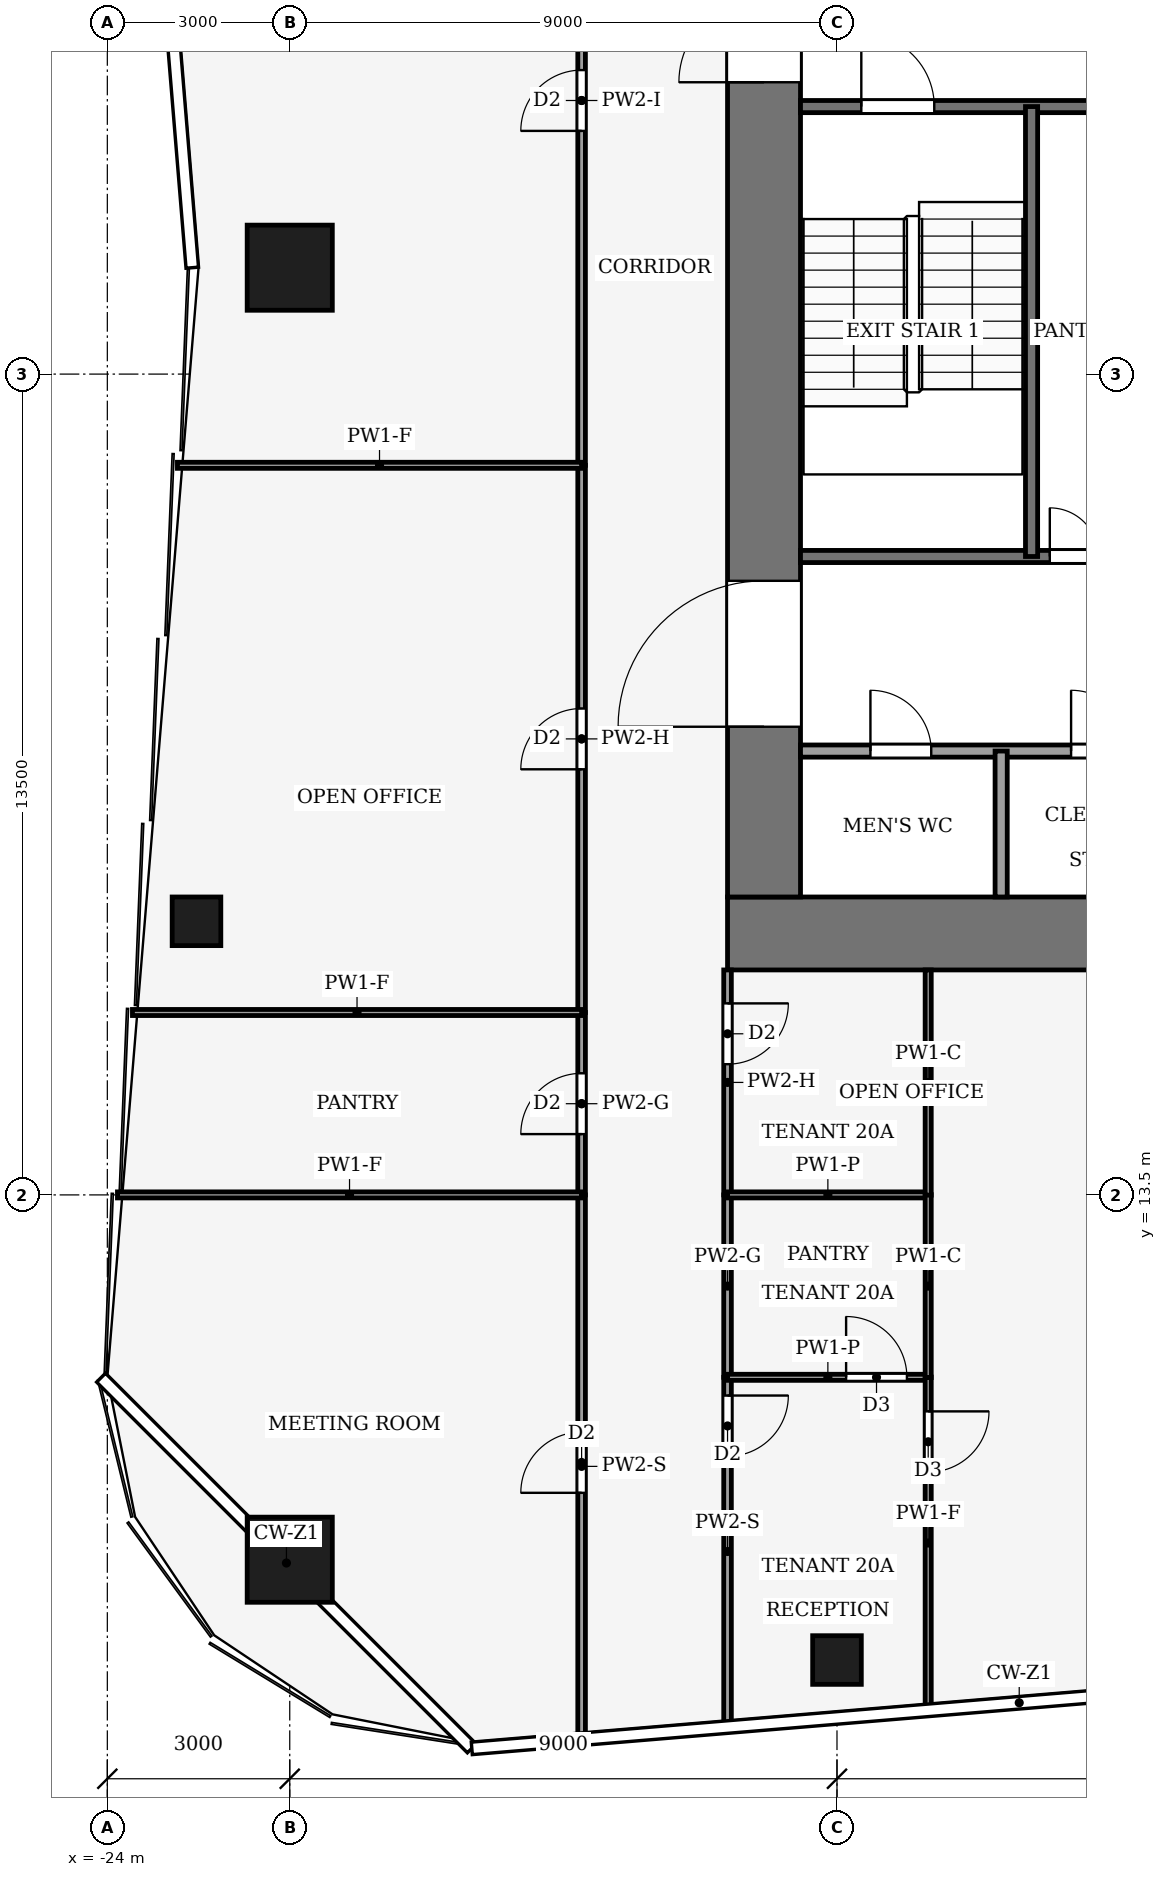
"""IFC4 building model, lengths in metres.
Left out: names, types, materials, properties, quantities, classifications, styles, units other than length and angle.
Written with IfcOpenShell. Run it as: python <this file> out.ifc"""

import sys

from ifc_helpers import new_model, si_unit, direction, frame, frame_2d, origin, origin_2d, place, context, subcontext, project, spatial, rectangle, hollow_rectangle, extrude, element, fill, save


model = new_model("IFC4")
c1 = context("Model", 3, precision=1e-05, world=origin(), true_north=direction((0.0, 1.0)))
c2 = subcontext(c1, "Body", "Model", "MODEL_VIEW")
j1 = project(units=[si_unit("LENGTHUNIT", "METRE"), si_unit("PLANEANGLEUNIT", "RADIAN")], contexts=[c1])
p1 = place(None, origin())
s1 = spatial("IfcSite", under=j1, at=p1, CompositionType="ELEMENT")
p2 = place(p1, origin())
s2 = spatial("IfcBuilding", under=s1, at=p2, CompositionType="ELEMENT")
p3 = place(p2, frame((0.0, 0.0, 90.0)))
s3 = spatial("IfcBuildingStorey", under=s2, at=p3, CompositionType="ELEMENT", Elevation=90.0)
p4 = place(p3, frame((-13.8, 17.8, -0.13), z_axis=(0.0, 0.0, 1.0), x_axis=(1.0, 0.0, 0.0)))
e1 = element("IfcWall", 1, at=p4, inside=s3, PredefinedType="SHEAR", context=c2, shape_type="SweptSolid", body=[
    extrude(rectangle(XDim=27.6, YDim=1.2, at=frame_2d((13.8, 0.0))), origin(), (0.0, 0.0, 1.0), 4.0),
])
p5 = place(p3, frame((-13.2, 18.4, -0.13), z_axis=(0.0, 0.0, 1.0), x_axis=(0.0, 1.0, 0.0)))
e2 = element("IfcWall", 2, at=p5, inside=s3, PredefinedType="SHEAR", context=c2, shape_type="SweptSolid", body=[
    extrude(rectangle(XDim=19.2, YDim=1.2, at=frame_2d((9.6, 0.0))), origin(), (0.0, 0.0, 1.0), 4.0),
])
p6 = place(p5, frame((2.8, 0.0, 0.13)))
e3 = element("IfcOpeningElement", 3, at=p6, cuts=e2, PredefinedType="OPENING", context=c2, shape_type="SweptSolid", body=[
    extrude(rectangle(XDim=2.4, YDim=2.4, at=frame_2d((1.2, 1.2))), frame((0.0, 0.61, 0.0), z_axis=(0.0, -1.0, 0.0), x_axis=(1.0, 0.0, 0.0)), (0.0, 0.0, 1.0), 1.22),
])
p7 = place(p5, frame((13.4, 0.0, 0.13)))
e4 = element("IfcOpeningElement", 4, at=p7, cuts=e2, PredefinedType="OPENING", context=c2, shape_type="SweptSolid", body=[
    extrude(rectangle(XDim=1.4, YDim=2.2, at=frame_2d((0.7, 1.1))), frame((0.0, 0.61, 0.0), z_axis=(0.0, -1.0, 0.0), x_axis=(1.0, 0.0, 0.0)), (0.0, 0.0, 1.0), 1.22),
])
for number, where, z_axis, x_axis in (
    (5, (-21.0, 7.5, 0.0), (0.0, 0.0, 1.0), (1.0, 0.0, 0.0)),
    (6, (-21.0, 28.75, 0.0), (0.0, 0.0, 1.0), (1.0, 0.0, 0.0)),
):
    element("IfcColumn", number, at=place(p3, frame(where, z_axis=z_axis, x_axis=x_axis)), inside=s3, PredefinedType="COLUMN", context=c2, shape_type="SweptSolid", body=[
        extrude(hollow_rectangle(XDim=1.4, YDim=1.4, WallThickness=0.08, at=origin_2d()), origin(), (0.0, 0.0, 1.0), 4.0),
    ])
for number, where, z_axis, x_axis in (
    (7, (-12.0, 5.85, 0.0), (0.0, 0.0, 1.0), (1.0, 0.0, 0.0)),
    (8, (-22.534, 18.0, 0.0), (0.0, 0.0, 1.0), (1.0, 0.0, 0.0)),
):
    element("IfcColumn", number, at=place(p3, frame(where, z_axis=z_axis, x_axis=x_axis)), inside=s3, PredefinedType="COLUMN", context=c2, shape_type="SweptSolid", body=[
        extrude(hollow_rectangle(XDim=0.8, YDim=0.8, WallThickness=0.04, at=origin_2d()), origin(), (0.0, 0.0, 1.0), 4.0),
    ])
p8 = place(p3, frame((-12.6, 20.8, 0.0), z_axis=(0.0, 0.0, 1.0), x_axis=(1.0, 0.0, 0.0)))
e9 = element("IfcWall", 9, at=p8, inside=s3, PredefinedType="PARTITIONING", context=c2, shape_type="SweptSolid", body=[
    extrude(rectangle(XDim=6.6, YDim=0.2, at=frame_2d((3.3, 0.0))), origin(), (0.0, 0.0, 1.0), 3.87),
])
p9 = place(p8, frame((1.15, 0.0, 0.0)))
e10 = element("IfcOpeningElement", 10, at=p9, cuts=e9, PredefinedType="OPENING", context=c2, shape_type="SweptSolid", body=[
    extrude(rectangle(XDim=1.0, YDim=2.1, at=frame_2d((0.5, 1.05))), frame((0.0, 0.11, 0.0), z_axis=(0.0, -1.0, 0.0), x_axis=(1.0, 0.0, 0.0)), (0.0, 0.0, 1.0), 0.22),
])
p10 = place(p8, frame((4.45, 0.0, 0.0)))
e11 = element("IfcOpeningElement", 11, at=p10, cuts=e9, PredefinedType="OPENING", context=c2, shape_type="SweptSolid", body=[
    extrude(rectangle(XDim=1.0, YDim=2.1, at=frame_2d((0.5, 1.05))), frame((0.0, 0.11, 0.0), z_axis=(0.0, -1.0, 0.0), x_axis=(1.0, 0.0, 0.0)), (0.0, 0.0, 1.0), 0.22),
])
p11 = place(p3, frame((-12.6, 24.0, 0.0), z_axis=(0.0, 0.0, 1.0), x_axis=(1.0, 0.0, 0.0)))
e12 = element("IfcWall", 12, at=p11, inside=s3, PredefinedType="PARTITIONING", context=c2, shape_type="SweptSolid", body=[
    extrude(rectangle(XDim=6.6, YDim=0.2, at=frame_2d((3.3, 0.0))), origin(), (0.0, 0.0, 1.0), 3.87),
])
p12 = place(p11, frame((4.1, 0.0, 0.0)))
e13 = element("IfcOpeningElement", 13, at=p12, cuts=e12, PredefinedType="OPENING", context=c2, shape_type="SweptSolid", body=[
    extrude(rectangle(XDim=0.8, YDim=2.1, at=frame_2d((0.4, 1.05))), frame((0.0, 0.11, 0.0), z_axis=(0.0, -1.0, 0.0), x_axis=(1.0, 0.0, 0.0)), (0.0, 0.0, 1.0), 0.22),
])
p13 = place(p11, frame((5.5, 0.0, 0.0)))
e14 = element("IfcOpeningElement", 14, at=p13, cuts=e12, PredefinedType="OPENING", context=c2, shape_type="SweptSolid", body=[
    extrude(rectangle(XDim=0.8, YDim=2.1, at=frame_2d((0.4, 1.05))), frame((0.0, 0.11, 0.0), z_axis=(0.0, -1.0, 0.0), x_axis=(1.0, 0.0, 0.0)), (0.0, 0.0, 1.0), 0.22),
])
p14 = place(p3, frame((-12.6, 31.4, 0.0), z_axis=(0.0, 0.0, 1.0), x_axis=(1.0, 0.0, 0.0)))
e15 = element("IfcWall", 15, at=p14, inside=s3, PredefinedType="PARTITIONING", context=c2, shape_type="SweptSolid", body=[
    extrude(rectangle(XDim=6.6, YDim=0.2, at=frame_2d((3.3, 0.0))), origin(), (0.0, 0.0, 1.0), 3.87),
])
p15 = place(p14, frame((1.0, 0.0, 0.0)))
e16 = element("IfcOpeningElement", 16, at=p15, cuts=e15, PredefinedType="OPENING", context=c2, shape_type="SweptSolid", body=[
    extrude(rectangle(XDim=1.2, YDim=2.2, at=frame_2d((0.6, 1.1))), frame((0.0, 0.11, 0.0), z_axis=(0.0, -1.0, 0.0), x_axis=(1.0, 0.0, 0.0)), (0.0, 0.0, 1.0), 0.22),
])
p16 = place(p3, frame((-9.3, 18.4, 0.0), z_axis=(0.0, 0.0, 1.0), x_axis=(0.0, 1.0, 0.0)))
e17 = element("IfcWall", 17, at=p16, inside=s3, PredefinedType="PARTITIONING", context=c2, shape_type="SweptSolid", body=[
    extrude(rectangle(XDim=2.4, YDim=0.2, at=frame_2d((1.2, 0.0))), origin(), (0.0, 0.0, 1.0), 3.87),
])
p17 = place(p3, frame((-8.8, 24.0, 0.0), z_axis=(0.0, 0.0, 1.0), x_axis=(0.0, 1.0, 0.0)))
e18 = element("IfcWall", 18, at=p17, inside=s3, PredefinedType="PARTITIONING", context=c2, shape_type="SweptSolid", body=[
    extrude(rectangle(XDim=7.4, YDim=0.2, at=frame_2d((3.7, 0.0))), origin(), (0.0, 0.0, 1.0), 3.87),
])
p18 = place(p3, frame((-16.2, 4.57, 0.0), z_axis=(0.0, 0.0, 1.0), x_axis=(0.0, 1.0, 0.0)))
e19 = element("IfcWall", 19, at=p18, inside=s3, PredefinedType="PARTITIONING", context=c2, shape_type="SweptSolid", body=[
    extrude(rectangle(XDim=8.93, YDim=0.125, at=frame_2d((4.465, 0.0))), origin(), (0.0, 0.0, 1.0), 3.04),
])
p19 = place(p18, frame((4.03, 0.0, 0.0)))
e20 = element("IfcOpeningElement", 20, at=p19, cuts=e19, PredefinedType="OPENING", context=c2, shape_type="SweptSolid", body=[
    extrude(rectangle(XDim=1.0, YDim=2.1, at=frame_2d((0.5, 1.05))), frame((0.0, 0.073, 0.0), z_axis=(0.0, -1.0, 0.0), x_axis=(1.0, 0.0, 0.0)), (0.0, 0.0, 1.0), 0.145),
])
p20 = place(p3, frame((-16.2, 13.5, 0.0), z_axis=(0.0, 0.0, 1.0), x_axis=(0.0, 1.0, 0.0)))
e21 = element("IfcWall", 21, at=p20, inside=s3, PredefinedType="PARTITIONING", context=c2, shape_type="SweptSolid", body=[
    extrude(rectangle(XDim=3.0, YDim=0.125, at=frame_2d((1.5, 0.0))), origin(), (0.0, 0.0, 1.0), 3.87),
])
p21 = place(p20, frame((1.0, 0.0, 0.0)))
e22 = element("IfcOpeningElement", 22, at=p21, cuts=e21, PredefinedType="OPENING", context=c2, shape_type="SweptSolid", body=[
    extrude(rectangle(XDim=1.0, YDim=2.1, at=frame_2d((0.5, 1.05))), frame((0.0, 0.073, 0.0), z_axis=(0.0, -1.0, 0.0), x_axis=(1.0, 0.0, 0.0)), (0.0, 0.0, 1.0), 0.145),
])
p22 = place(p3, frame((-16.2, 16.5, 0.0), z_axis=(0.0, 0.0, 1.0), x_axis=(0.0, 1.0, 0.0)))
e23 = element("IfcWall", 23, at=p22, inside=s3, PredefinedType="PARTITIONING", context=c2, shape_type="SweptSolid", body=[
    extrude(rectangle(XDim=9.0, YDim=0.125, at=frame_2d((4.5, 0.0))), origin(), (0.0, 0.0, 1.0), 3.14),
])
p23 = place(p22, frame((4.0, 0.0, 0.0)))
e24 = element("IfcOpeningElement", 24, at=p23, cuts=e23, PredefinedType="OPENING", context=c2, shape_type="SweptSolid", body=[
    extrude(rectangle(XDim=1.0, YDim=2.1, at=frame_2d((0.5, 1.05))), frame((0.0, 0.073, 0.0), z_axis=(0.0, -1.0, 0.0), x_axis=(1.0, 0.0, 0.0)), (0.0, 0.0, 1.0), 0.145),
])
p24 = place(p3, frame((-16.2, 25.5, 0.0), z_axis=(0.0, 0.0, 1.0), x_axis=(0.0, 1.0, 0.0)))
e25 = element("IfcWall", 25, at=p24, inside=s3, PredefinedType="PARTITIONING", context=c2, shape_type="SweptSolid", body=[
    extrude(rectangle(XDim=12.0, YDim=0.125, at=frame_2d((6.0, 0.0))), origin(), (0.0, 0.0, 1.0), 3.48),
])
p25 = place(p24, frame((5.5, 0.0, 0.0)))
e26 = element("IfcOpeningElement", 26, at=p25, cuts=e25, PredefinedType="OPENING", context=c2, shape_type="SweptSolid", body=[
    extrude(rectangle(XDim=1.0, YDim=2.1, at=frame_2d((0.5, 1.05))), frame((0.0, 0.073, 0.0), z_axis=(0.0, -1.0, 0.0), x_axis=(1.0, 0.0, 0.0)), (0.0, 0.0, 1.0), 0.145),
])
p26 = place(p3, frame((-13.8, 10.5, 0.0), z_axis=(0.0, 0.0, 1.0), x_axis=(0.0, -1.0, 0.0)))
e27 = element("IfcWall", 27, at=p26, inside=s3, PredefinedType="PARTITIONING", context=c2, shape_type="SweptSolid", body=[
    extrude(rectangle(XDim=5.73, YDim=0.125, at=frame_2d((2.865, 0.0))), origin(), (0.0, 0.0, 1.0), 3.04),
])
p27 = place(p26, frame((0.3, 0.0, 0.0)))
e28 = element("IfcOpeningElement", 28, at=p27, cuts=e27, PredefinedType="OPENING", context=c2, shape_type="SweptSolid", body=[
    extrude(rectangle(XDim=1.0, YDim=2.1, at=frame_2d((0.5, 1.05))), frame((0.0, 0.073, 0.0), z_axis=(0.0, -1.0, 0.0), x_axis=(1.0, 0.0, 0.0)), (0.0, 0.0, 1.0), 0.145),
])
p28 = place(p3, frame((-13.8, 10.5, 0.0), z_axis=(0.0, 0.0, 1.0), x_axis=(0.0, 1.0, 0.0)))
e29 = element("IfcWall", 29, at=p28, inside=s3, PredefinedType="PARTITIONING", context=c2, shape_type="SweptSolid", body=[
    extrude(rectangle(XDim=3.0, YDim=0.125, at=frame_2d((1.5, 0.0))), origin(), (0.0, 0.0, 1.0), 3.87),
])
p29 = place(p3, frame((-13.8, 17.2, 0.0), z_axis=(0.0, 0.0, 1.0), x_axis=(0.0, -1.0, 0.0)))
e30 = element("IfcWall", 30, at=p29, inside=s3, PredefinedType="PARTITIONING", context=c2, shape_type="SweptSolid", body=[
    extrude(rectangle(XDim=3.7, YDim=0.125, at=frame_2d((1.85, 0.0))), origin(), (0.0, 0.0, 1.0), 3.14),
])
p30 = place(p29, frame((0.55, 0.0, 0.0)))
e31 = element("IfcOpeningElement", 31, at=p30, cuts=e30, PredefinedType="OPENING", context=c2, shape_type="SweptSolid", body=[
    extrude(rectangle(XDim=1.0, YDim=2.1, at=frame_2d((0.5, 1.05))), frame((0.0, 0.073, 0.0), z_axis=(0.0, -1.0, 0.0), x_axis=(1.0, 0.0, 0.0)), (0.0, 0.0, 1.0), 0.145),
])
p31 = place(p3, frame((-16.2, 13.5, 0.0), z_axis=(0.0, 0.0, 1.0), x_axis=(-1.0, 0.0, 0.0)))
e32 = element("IfcWall", 32, at=p31, inside=s3, PredefinedType="PARTITIONING", context=c2, shape_type="SweptSolid", body=[
    extrude(rectangle(XDim=7.634, YDim=0.1, at=frame_2d((3.817, 0.0))), origin(), (0.0, 0.0, 1.0), 3.04),
])
p32 = place(p3, frame((-16.2, 16.5, 0.0), z_axis=(0.0, 0.0, 1.0), x_axis=(-1.0, 0.0, 0.0)))
e33 = element("IfcWall", 33, at=p32, inside=s3, PredefinedType="PARTITIONING", context=c2, shape_type="SweptSolid", body=[
    extrude(rectangle(XDim=7.387, YDim=0.1, at=frame_2d((3.693, 0.0))), origin(), (0.0, 0.0, 1.0), 3.04),
])
p33 = place(p3, frame((-16.2, 25.5, 0.0), z_axis=(0.0, 0.0, 1.0), x_axis=(-1.0, 0.0, 0.0)))
e34 = element("IfcWall", 34, at=p33, inside=s3, PredefinedType="PARTITIONING", context=c2, shape_type="SweptSolid", body=[
    extrude(rectangle(XDim=6.647, YDim=0.1, at=frame_2d((3.324, 0.0))), origin(), (0.0, 0.0, 1.0), 3.04),
])
p34 = place(p3, frame((-13.8, 10.5, 0.0), z_axis=(0.0, 0.0, 1.0), x_axis=(1.0, 0.0, 0.0)))
e35 = element("IfcWall", 35, at=p34, inside=s3, PredefinedType="PARTITIONING", context=c2, shape_type="SweptSolid", body=[
    extrude(rectangle(XDim=3.3, YDim=0.1, at=frame_2d((1.65, 0.0))), origin(), (0.0, 0.0, 1.0), 3.44),
])
p35 = place(p34, frame((1.95, 0.0, 0.0)))
e36 = element("IfcOpeningElement", 36, at=p35, cuts=e35, PredefinedType="OPENING", context=c2, shape_type="SweptSolid", body=[
    extrude(rectangle(XDim=1.0, YDim=2.1, at=frame_2d((0.5, 1.05))), frame((0.0, 0.06, 0.0), z_axis=(0.0, -1.0, 0.0), x_axis=(1.0, 0.0, 0.0)), (0.0, 0.0, 1.0), 0.12),
])
p36 = place(p3, frame((-10.5, 10.504, 0.0), z_axis=(0.0, 0.0, 1.0), x_axis=(0.0, -1.0, 0.0)))
e37 = element("IfcWall", 37, at=p36, inside=s3, PredefinedType="PARTITIONING", context=c2, shape_type="SweptSolid", body=[
    extrude(rectangle(XDim=5.459, YDim=0.1, at=frame_2d((2.729, 0.0))), origin(), (0.0, 0.0, 1.0), 3.04),
])
p37 = place(p36, frame((0.564, 0.0, 0.0)))
e38 = element("IfcOpeningElement", 38, at=p37, cuts=e37, PredefinedType="OPENING", context=c2, shape_type="SweptSolid", body=[
    extrude(rectangle(XDim=1.0, YDim=2.1, at=frame_2d((0.5, 1.05))), frame((0.0, 0.06, 0.0), z_axis=(0.0, -1.0, 0.0), x_axis=(1.0, 0.0, 0.0)), (0.0, 0.0, 1.0), 0.12),
])
p38 = place(p3, frame((-10.5, 13.5, 0.0), z_axis=(0.0, 0.0, 1.0), x_axis=(-1.0, 0.0, 0.0)))
e39 = element("IfcWall", 39, at=p38, inside=s3, PredefinedType="PARTITIONING", context=c2, shape_type="SweptSolid", body=[
    extrude(rectangle(XDim=3.3, YDim=0.1, at=frame_2d((1.65, 0.0))), origin(), (0.0, 0.0, 1.0), 3.44),
])
p39 = place(p3, frame((-10.5, 10.496, 0.0), z_axis=(0.0, 0.0, 1.0), x_axis=(0.0, 1.0, 0.0)))
e40 = element("IfcWall", 40, at=p39, inside=s3, PredefinedType="PARTITIONING", context=c2, shape_type="SweptSolid", body=[
    extrude(rectangle(XDim=3.008, YDim=0.1, at=frame_2d((1.504, 0.0))), origin(), (0.0, 0.0, 1.0), 3.87),
])
p40 = place(p3, frame((-10.5, 13.496, 0.0), z_axis=(0.0, 0.0, 1.0), x_axis=(0.0, 1.0, 0.0)))
e41 = element("IfcWall", 41, at=p40, inside=s3, PredefinedType="PARTITIONING", context=c2, shape_type="SweptSolid", body=[
    extrude(rectangle(XDim=3.704, YDim=0.1, at=frame_2d((1.852, 0.0))), origin(), (0.0, 0.0, 1.0), 3.87),
])
p41 = place(p9, origin())
e42 = element("IfcDoor", 42, at=p41, inside=s3, OperationType="SINGLE_SWING_LEFT", PredefinedType="DOOR", context=c2, shape_type="SweptSolid", body=[
    extrude(rectangle(XDim=1.0, YDim=2.1, at=frame_2d((0.5, 1.05))), frame((0.0, 0.025, 0.0), z_axis=(0.0, -1.0, 0.0), x_axis=(1.0, 0.0, 0.0)), (0.0, 0.0, 1.0), 0.05),
])
fill(e10, e42)
p42 = place(p10, origin())
e43 = element("IfcDoor", 43, at=p42, inside=s3, OperationType="SINGLE_SWING_LEFT", PredefinedType="DOOR", context=c2, shape_type="SweptSolid", body=[
    extrude(rectangle(XDim=1.0, YDim=2.1, at=frame_2d((0.5, 1.05))), frame((0.0, 0.025, 0.0), z_axis=(0.0, -1.0, 0.0), x_axis=(1.0, 0.0, 0.0)), (0.0, 0.0, 1.0), 0.05),
])
fill(e11, e43)
p43 = place(p12, origin())
e44 = element("IfcDoor", 44, at=p43, inside=s3, OperationType="SINGLE_SWING_LEFT", PredefinedType="DOOR", context=c2, shape_type="SweptSolid", body=[
    extrude(rectangle(XDim=0.8, YDim=2.1, at=frame_2d((0.4, 1.05))), frame((0.0, 0.025, 0.0), z_axis=(0.0, -1.0, 0.0), x_axis=(1.0, 0.0, 0.0)), (0.0, 0.0, 1.0), 0.05),
])
fill(e13, e44)
p44 = place(p15, origin())
e45 = element("IfcDoor", 45, at=p44, inside=s3, OperationType="SINGLE_SWING_RIGHT", PredefinedType="DOOR", context=c2, shape_type="SweptSolid", body=[
    extrude(rectangle(XDim=1.2, YDim=2.2, at=frame_2d((0.6, 1.1))), frame((0.0, 0.025, 0.0), z_axis=(0.0, -1.0, 0.0), x_axis=(1.0, 0.0, 0.0)), (0.0, 0.0, 1.0), 0.05),
])
fill(e16, e45)
p45 = place(p6, origin())
e46 = element("IfcDoor", 46, at=p45, inside=s3, OperationType="DOUBLE_DOOR_SINGLE_SWING", PredefinedType="DOOR", context=c2, shape_type="SweptSolid", body=[
    extrude(rectangle(XDim=2.4, YDim=2.4, at=frame_2d((1.2, 1.2))), frame((0.0, 0.025, 0.0), z_axis=(0.0, -1.0, 0.0), x_axis=(1.0, 0.0, 0.0)), (0.0, 0.0, 1.0), 0.05),
])
fill(e3, e46)
p46 = place(p7, origin())
e47 = element("IfcDoor", 47, at=p46, inside=s3, OperationType="SINGLE_SWING_RIGHT", PredefinedType="DOOR", context=c2, shape_type="SweptSolid", body=[
    extrude(rectangle(XDim=1.4, YDim=2.2, at=frame_2d((0.7, 1.1))), frame((0.0, 0.025, 0.0), z_axis=(0.0, -1.0, 0.0), x_axis=(1.0, 0.0, 0.0)), (0.0, 0.0, 1.0), 0.05),
])
fill(e4, e47)
p47 = place(p19, origin())
e48 = element("IfcDoor", 48, at=p47, inside=s3, OperationType="SINGLE_SWING_RIGHT", PredefinedType="DOOR", context=c2, shape_type="SweptSolid", body=[
    extrude(rectangle(XDim=1.0, YDim=2.1, at=frame_2d((0.5, 1.05))), frame((0.0, 0.025, 0.0), z_axis=(0.0, -1.0, 0.0), x_axis=(1.0, 0.0, 0.0)), (0.0, 0.0, 1.0), 0.05),
])
fill(e20, e48)
p48 = place(p21, origin())
e49 = element("IfcDoor", 49, at=p48, inside=s3, OperationType="SINGLE_SWING_RIGHT", PredefinedType="DOOR", context=c2, shape_type="SweptSolid", body=[
    extrude(rectangle(XDim=1.0, YDim=2.1, at=frame_2d((0.5, 1.05))), frame((0.0, 0.025, 0.0), z_axis=(0.0, -1.0, 0.0), x_axis=(1.0, 0.0, 0.0)), (0.0, 0.0, 1.0), 0.05),
])
fill(e22, e49)
p49 = place(p23, origin())
e50 = element("IfcDoor", 50, at=p49, inside=s3, OperationType="SINGLE_SWING_LEFT", PredefinedType="DOOR", context=c2, shape_type="SweptSolid", body=[
    extrude(rectangle(XDim=1.0, YDim=2.1, at=frame_2d((0.5, 1.05))), frame((0.0, 0.025, 0.0), z_axis=(0.0, -1.0, 0.0), x_axis=(1.0, 0.0, 0.0)), (0.0, 0.0, 1.0), 0.05),
])
fill(e24, e50)
p50 = place(p25, origin())
e51 = element("IfcDoor", 51, at=p50, inside=s3, OperationType="SINGLE_SWING_RIGHT", PredefinedType="DOOR", context=c2, shape_type="SweptSolid", body=[
    extrude(rectangle(XDim=1.0, YDim=2.1, at=frame_2d((0.5, 1.05))), frame((0.0, 0.025, 0.0), z_axis=(0.0, -1.0, 0.0), x_axis=(1.0, 0.0, 0.0)), (0.0, 0.0, 1.0), 0.05),
])
fill(e26, e51)
p51 = place(p27, origin())
e52 = element("IfcDoor", 52, at=p51, inside=s3, OperationType="SINGLE_SWING_LEFT", PredefinedType="DOOR", context=c2, shape_type="SweptSolid", body=[
    extrude(rectangle(XDim=1.0, YDim=2.1, at=frame_2d((0.5, 1.05))), frame((0.0, 0.025, 0.0), z_axis=(0.0, -1.0, 0.0), x_axis=(1.0, 0.0, 0.0)), (0.0, 0.0, 1.0), 0.05),
])
fill(e28, e52)
p52 = place(p30, origin())
e53 = element("IfcDoor", 53, at=p52, inside=s3, OperationType="SINGLE_SWING_LEFT", PredefinedType="DOOR", context=c2, shape_type="SweptSolid", body=[
    extrude(rectangle(XDim=1.0, YDim=2.1, at=frame_2d((0.5, 1.05))), frame((0.0, 0.025, 0.0), z_axis=(0.0, -1.0, 0.0), x_axis=(1.0, 0.0, 0.0)), (0.0, 0.0, 1.0), 0.05),
])
fill(e31, e53)
p53 = place(p35, origin())
e54 = element("IfcDoor", 54, at=p53, inside=s3, OperationType="SINGLE_SWING_RIGHT", PredefinedType="DOOR", context=c2, shape_type="SweptSolid", body=[
    extrude(rectangle(XDim=1.0, YDim=2.1, at=frame_2d((0.5, 1.05))), frame((0.0, 0.025, 0.0), z_axis=(0.0, -1.0, 0.0), x_axis=(1.0, 0.0, 0.0)), (0.0, 0.0, 1.0), 0.05),
])
fill(e36, e54)
p54 = place(p37, origin())
e55 = element("IfcDoor", 55, at=p54, inside=s3, OperationType="SINGLE_SWING_LEFT", PredefinedType="DOOR", context=c2, shape_type="SweptSolid", body=[
    extrude(rectangle(XDim=1.0, YDim=2.1, at=frame_2d((0.5, 1.05))), frame((0.0, 0.025, 0.0), z_axis=(0.0, -1.0, 0.0), x_axis=(1.0, 0.0, 0.0)), (0.0, 0.0, 1.0), 0.05),
])
fill(e38, e55)
save(model, sys.argv[1])
